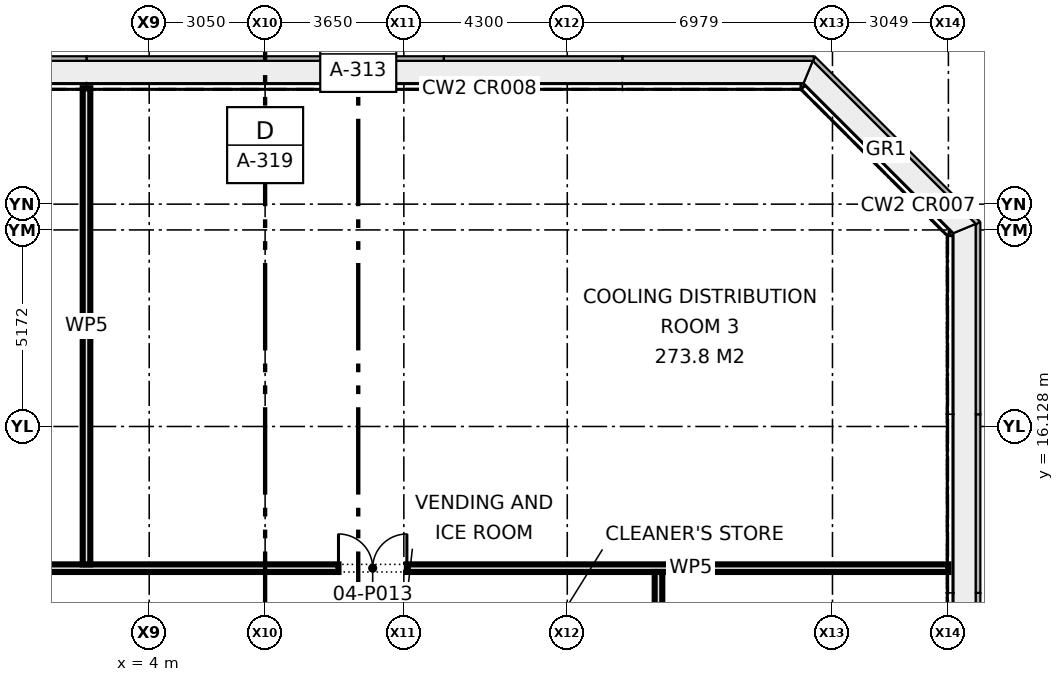
"""IFC4 building model, lengths in metres.
Left out: names, types, materials, properties, quantities, classifications, styles, units other than length and angle.
Written with IfcOpenShell. Run it as: python <this file> out.ifc"""

import sys

from ifc_helpers import new_model, si_unit, direction, frame, frame_2d, origin, place, context, subcontext, project, spatial, rectangle, extrude, element, fill, save


model = new_model("IFC4")
c1 = context("Model", 3, precision=1e-05, world=origin(), true_north=direction((0.0, 1.0)))
c2 = subcontext(c1, "Body", "Model", "MODEL_VIEW")
j1 = project(units=[si_unit("LENGTHUNIT", "METRE"), si_unit("PLANEANGLEUNIT", "RADIAN")], contexts=[c1])
p1 = place(None, origin())
s1 = spatial("IfcSite", under=j1, at=p1, CompositionType="ELEMENT")
p2 = place(p1, origin())
s2 = spatial("IfcBuilding", under=s1, at=p2, CompositionType="ELEMENT")
p3 = place(p2, frame((0.0, 0.0, 16.1)))
s3 = spatial("IfcBuildingStorey", under=s2, at=p3, CompositionType="ELEMENT", Elevation=16.1)
p4 = place(p3, frame((-25.03, 12.4, 0.0), z_axis=(0.0, 0.0, 1.0), x_axis=(1.0, 0.0, 0.0)))
e1 = element("IfcWall", 1, at=p4, inside=s3, PredefinedType="PARTITIONING", context=c2, shape_type="SweptSolid", body=[
    extrude(rectangle(XDim=50.06, YDim=0.2, at=frame_2d((25.03, 0.0))), origin(), (0.0, 0.0, 1.0), 4.575),
])
p5 = place(p4, frame((21.18, 0.0, 0.0)))
e2 = element("IfcOpeningElement", 2, at=p5, cuts=e1, PredefinedType="OPENING", context=c2, shape_type="SweptSolid", body=[
    extrude(rectangle(XDim=1.8, YDim=2.1, at=frame_2d((0.9, 1.05))), frame((0.0, 0.11, 0.0), z_axis=(0.0, -1.0, 0.0), x_axis=(1.0, 0.0, 0.0)), (0.0, 0.0, 1.0), 0.22),
])
p6 = place(p4, frame((9.58, 0.0, 0.0)))
e3 = element("IfcOpeningElement", 3, at=p6, cuts=e1, PredefinedType="OPENING", context=c2, shape_type="SweptSolid", body=[
    extrude(rectangle(XDim=1.0, YDim=2.1, at=frame_2d((0.5, 1.05))), frame((0.0, 0.11, 0.0), z_axis=(0.0, -1.0, 0.0), x_axis=(1.0, 0.0, 0.0)), (0.0, 0.0, 1.0), 0.22),
])
p7 = place(p4, frame((12.58, 0.0, 0.0)))
e4 = element("IfcOpeningElement", 4, at=p7, cuts=e1, PredefinedType="OPENING", context=c2, shape_type="SweptSolid", body=[
    extrude(rectangle(XDim=1.0, YDim=2.1, at=frame_2d((0.5, 1.05))), frame((0.0, 0.11, 0.0), z_axis=(0.0, -1.0, 0.0), x_axis=(1.0, 0.0, 0.0)), (0.0, 0.0, 1.0), 0.22),
])
p8 = place(p4, frame((15.18, 0.0, 0.0)))
e5 = element("IfcOpeningElement", 5, at=p8, cuts=e1, PredefinedType="OPENING", context=c2, shape_type="SweptSolid", body=[
    extrude(rectangle(XDim=1.0, YDim=2.1, at=frame_2d((0.5, 1.05))), frame((0.0, 0.11, 0.0), z_axis=(0.0, -1.0, 0.0), x_axis=(1.0, 0.0, 0.0)), (0.0, 0.0, 1.0), 0.22),
])
p9 = place(p4, frame((34.01, 0.0, 0.0)))
e6 = element("IfcOpeningElement", 6, at=p9, cuts=e1, PredefinedType="OPENING", context=c2, shape_type="SweptSolid", body=[
    extrude(rectangle(XDim=1.8, YDim=2.1, at=frame_2d((0.9, 1.05))), frame((0.0, 0.11, 0.0), z_axis=(0.0, -1.0, 0.0), x_axis=(1.0, 0.0, 0.0)), (0.0, 0.0, 1.0), 0.22),
])
p10 = place(p3, frame((17.4, -12.3, 0.0), z_axis=(0.0, 0.0, 1.0), x_axis=(0.0, 1.0, 0.0)))
e7 = element("IfcWall", 7, at=p10, inside=s3, PredefinedType="PARTITIONING", context=c2, shape_type="SweptSolid", body=[
    extrude(rectangle(XDim=24.6, YDim=0.2, at=frame_2d((12.3, 0.0))), origin(), (0.0, 0.0, 1.0), 4.575),
])
p11 = place(p10, frame((6.375, 0.0, 0.0)))
e8 = element("IfcOpeningElement", 8, at=p11, cuts=e7, PredefinedType="OPENING", context=c2, shape_type="SweptSolid", body=[
    extrude(rectangle(XDim=1.8, YDim=2.1, at=frame_2d((0.9, 1.05))), frame((0.0, 0.11, 0.0), z_axis=(0.0, -1.0, 0.0), x_axis=(1.0, 0.0, 0.0)), (0.0, 0.0, 1.0), 0.22),
])
p12 = place(p10, frame((19.075, 0.0, 0.0)))
e9 = element("IfcOpeningElement", 9, at=p12, cuts=e7, PredefinedType="OPENING", context=c2, shape_type="SweptSolid", body=[
    extrude(rectangle(XDim=1.2, YDim=2.1, at=frame_2d((0.6, 1.05))), frame((0.0, 0.11, 0.0), z_axis=(0.0, -1.0, 0.0), x_axis=(1.0, 0.0, 0.0)), (0.0, 0.0, 1.0), 0.22),
])
p13 = place(p3, frame((2.35, 12.5, 0.0), z_axis=(0.0, 0.0, 1.0), x_axis=(0.0, 1.0, 0.0)))
e10 = element("IfcWall", 10, at=p13, inside=s3, PredefinedType="PARTITIONING", context=c2, shape_type="SweptSolid", body=[
    extrude(rectangle(XDim=12.53, YDim=0.2, at=frame_2d((6.265, 0.0))), origin(), (0.0, 0.0, 1.0), 4.575),
])
p14 = place(p9, origin())
e11 = element("IfcDoor", 11, at=p14, inside=s3, OperationType="DOUBLE_DOOR_SINGLE_SWING", PredefinedType="DOOR", context=c2, shape_type="SweptSolid", body=[
    extrude(rectangle(XDim=1.8, YDim=2.1, at=frame_2d((0.9, 1.05))), frame((0.0, 0.025, 0.0), z_axis=(0.0, -1.0, 0.0), x_axis=(1.0, 0.0, 0.0)), (0.0, 0.0, 1.0), 0.05),
])
fill(e6, e11)
save(model, sys.argv[1])
